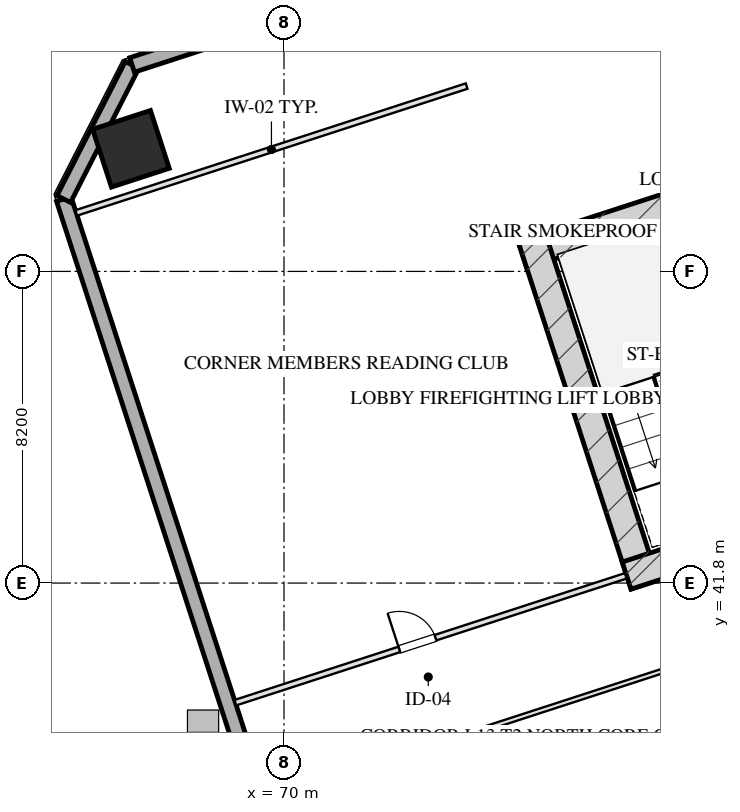
"""IFC4 building model, lengths in metres.
Left out: names, types, materials, properties, quantities, classifications, styles, units other than length and angle.
Written with IfcOpenShell. Run it as: python <this file> out.ifc"""

import sys

from ifc_helpers import new_model, si_unit, direction, frame, frame_2d, origin, origin_2d, place, context, subcontext, project, spatial, rectangle, hollow_rectangle, extrude, element, fill, save


model = new_model("IFC4")
c1 = context("Model", 3, precision=1e-05, world=origin(), true_north=direction((0.0, 1.0)))
c2 = subcontext(c1, "Body", "Model", "MODEL_VIEW")
j1 = project(units=[si_unit("LENGTHUNIT", "METRE"), si_unit("PLANEANGLEUNIT", "RADIAN")], contexts=[c1])
p1 = place(None, origin())
s1 = spatial("IfcSite", under=j1, at=p1, CompositionType="ELEMENT")
p2 = place(p1, origin())
s2 = spatial("IfcBuilding", under=s1, at=p2, CompositionType="ELEMENT")
p3 = place(p2, frame((0.0, 0.0, 57.5)))
s3 = spatial("IfcBuildingStorey", under=s2, at=p3, CompositionType="ELEMENT", Elevation=57.5)
p4 = place(p3, frame((76.272, 50.443, 0.0), z_axis=(0.0, 0.0, 1.0), x_axis=(0.951056072937, 0.309018358888, 0.0)))
e1 = element("IfcWall", 1, at=p4, inside=s3, PredefinedType="SHEAR", context=c2, shape_type="SweptSolid", body=[
    extrude(rectangle(XDim=16.55, YDim=0.75, at=frame_2d((8.275, 0.0))), origin(), (0.0, 0.0, 1.0), 3.45),
])
p5 = place(p3, frame((79.489, 41.756, 0.0), z_axis=(0.0, 0.0, 1.0), x_axis=(-0.309016134813, 0.951056795583, 0.0)))
e2 = element("IfcWall", 2, at=p5, inside=s3, PredefinedType="SHEAR", context=c2, shape_type="SweptSolid", body=[
    extrude(rectangle(XDim=9.63, YDim=0.75, at=frame_2d((4.815, 0.0))), origin(), (0.0, 0.0, 1.0), 3.45),
])
p6 = place(p3, frame((79.016, 41.997, 0.0), z_axis=(0.0, 0.0, 1.0), x_axis=(0.95106038264, 0.309005094736, 0.0)))
e3 = element("IfcWall", 3, at=p6, inside=s3, PredefinedType="SHEAR", context=c2, shape_type="SweptSolid", body=[
    extrude(rectangle(XDim=4.295, YDim=0.75, at=frame_2d((2.147, 0.0))), origin(), (0.0, 0.0, 1.0), 3.45),
])
p7 = place(p3, frame((65.973, 53.226, 0.0), z_axis=(0.0, 0.0, 1.0), x_axis=(0.951056516295, 0.309016994375, 0.0)))
e4 = element("IfcColumn", 4, at=p7, inside=s3, PredefinedType="COLUMN", context=c2, shape_type="SweptSolid", body=[
    extrude(hollow_rectangle(XDim=1.6, YDim=1.6, WallThickness=0.055, at=origin_2d()), origin(), (0.0, 0.0, 1.0), 3.451),
])
p8 = place(p3, frame((79.655, 4.352, 0.0), z_axis=(0.0, 0.0, 1.0), x_axis=(-0.309014526607, 0.951057318118, 0.0)))
e5 = element("IfcWall", 5, at=p8, inside=s3, PredefinedType="SOLIDWALL", context=c2, shape_type="SweptSolid", body=[
    extrude(rectangle(XDim=50.0, YDim=0.4, at=frame_2d((25.0, 0.0))), origin(), (0.0, 0.0, 1.0), 2.61),
])
p9 = place(p8, frame((17.35, 0.0, 0.75)))
e6 = element("IfcOpeningElement", 6, at=p9, cuts=e5, PredefinedType="OPENING", context=c2, shape_type="SweptSolid", body=[
    extrude(rectangle(XDim=2.5, YDim=1.46, at=frame_2d((1.25, 0.73))), frame((0.0, 0.21, 0.0), z_axis=(0.0, -1.0, 0.0), x_axis=(1.0, 0.0, 0.0)), (0.0, 0.0, 1.0), 0.42),
])
p10 = place(p8, frame((30.25, 0.0, 0.0)))
e7 = element("IfcOpeningElement", 7, at=p10, cuts=e5, PredefinedType="OPENING", context=c2, shape_type="SweptSolid", body=[
    extrude(rectangle(XDim=1.1, YDim=2.15, at=frame_2d((0.55, 1.075))), frame((0.0, 0.21, 0.0), z_axis=(0.0, -1.0, 0.0), x_axis=(1.0, 0.0, 0.0)), (0.0, 0.0, 1.0), 0.42),
])
p11 = place(p3, frame((64.205, 51.905, 0.0), z_axis=(0.0, 0.0, 1.0), x_axis=(0.453958106755, 0.891023028497, 0.0)))
e8 = element("IfcWall", 8, at=p11, inside=s3, PredefinedType="SOLIDWALL", context=c2, shape_type="SweptSolid", body=[
    extrude(rectangle(XDim=3.96, YDim=0.4, at=frame_2d((1.98, 0.0))), origin(), (0.0, 0.0, 1.0), 2.61),
])
p12 = place(p3, frame((66.002, 55.433, 0.0), z_axis=(0.0, 0.0, 1.0), x_axis=(0.951055939317, 0.309018770125, 0.0)))
e9 = element("IfcWall", 9, at=p12, inside=s3, PredefinedType="SOLIDWALL", context=c2, shape_type="SweptSolid", body=[
    extrude(rectangle(XDim=32.4, YDim=0.4, at=frame_2d((16.2, 0.0))), origin(), (0.0, 0.0, 1.0), 2.61),
])
p13 = place(p3, frame((64.534, 51.539, 0.0), z_axis=(0.0, 0.0, 1.0), x_axis=(0.951056658866, 0.309016555588, 0.0)))
e10 = element("IfcWall", 10, at=p13, inside=s3, PredefinedType="PARTITIONING", context=c2, shape_type="SweptSolid", body=[
    extrude(rectangle(XDim=10.8, YDim=0.15, at=frame_2d((5.4, 0.0))), origin(), (0.0, 0.0, 1.0), 3.175),
])
p14 = place(p3, frame((68.721, 38.652, 0.0), z_axis=(0.0, 0.0, 1.0), x_axis=(0.951056658866, 0.309016555588, 0.0)))
e11 = element("IfcWall", 11, at=p14, inside=s3, PredefinedType="PARTITIONING", context=c2, shape_type="SweptSolid", body=[
    extrude(rectangle(XDim=10.8, YDim=0.15, at=frame_2d((5.4, 0.0))), origin(), (0.0, 0.0, 1.0), 3.175),
])
p15 = place(p14, frame((4.536, 0.0, 0.0)))
e12 = element("IfcOpeningElement", 12, at=p15, cuts=e11, PredefinedType="OPENING", context=c2, shape_type="SweptSolid", body=[
    extrude(rectangle(XDim=1.0, YDim=2.05, at=frame_2d((0.5, 1.025))), frame((0.0, 0.085, 0.0), z_axis=(0.0, -1.0, 0.0), x_axis=(1.0, 0.0, 0.0)), (0.0, 0.0, 1.0), 0.17),
])
p16 = place(p3, frame((69.549, 36.103, 0.0), z_axis=(0.0, 0.0, 1.0), x_axis=(0.951054756643, 0.309022409974, 0.0)))
e13 = element("IfcWall", 13, at=p16, inside=s3, PredefinedType="PARTITIONING", context=c2, shape_type="SweptSolid", body=[
    extrude(rectangle(XDim=15.175, YDim=0.12, at=frame_2d((7.587, 0.0))), origin(), (0.0, 0.0, 1.0), 3.175),
])
p17 = place(p15, origin())
e14 = element("IfcDoor", 14, at=p17, inside=s3, OperationType="SINGLE_SWING_LEFT", PredefinedType="DOOR", context=c2, shape_type="SweptSolid", body=[
    extrude(rectangle(XDim=1.0, YDim=2.05, at=frame_2d((0.5, 1.025))), frame((0.0, 0.025, 0.0), z_axis=(0.0, -1.0, 0.0), x_axis=(1.0, 0.0, 0.0)), (0.0, 0.0, 1.0), 0.05),
])
fill(e12, e14)
save(model, sys.argv[1])
